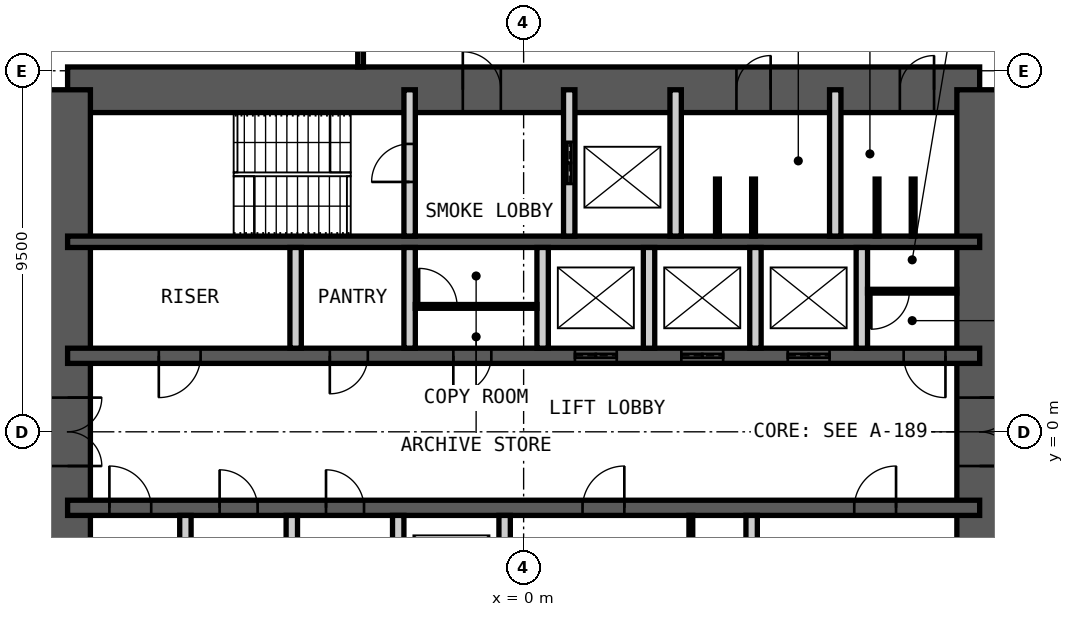
"""IFC4 building model, lengths in metres.
Left out: names, types, materials, properties, quantities, classifications, styles, units other than length and angle.
Written with IfcOpenShell. Run it as: python <this file> out.ifc"""

import sys

from ifc_helpers import new_model, si_unit, direction, frame, frame_2d, origin, place, context, subcontext, project, spatial, rectangle, extrude, element, fill, save


model = new_model("IFC4")
c1 = context("Model", 3, precision=1e-05, world=origin(), true_north=direction((0.0, 1.0)))
c2 = subcontext(c1, "Body", "Model", "MODEL_VIEW")
j1 = project(units=[si_unit("LENGTHUNIT", "METRE"), si_unit("PLANEANGLEUNIT", "RADIAN")], contexts=[c1])
p1 = place(None, origin())
s1 = spatial("IfcSite", under=j1, at=p1, CompositionType="ELEMENT")
p2 = place(p1, origin())
s2 = spatial("IfcBuilding", under=s1, at=p2, CompositionType="ELEMENT")
p3 = place(p2, frame((0.0, 0.0, 235.0)))
s3 = spatial("IfcBuildingStorey", under=s2, at=p3, CompositionType="ELEMENT", Elevation=235.0)
p4 = place(p3, frame((-12.0, 9.0, 0.0), z_axis=(0.0, 0.0, 1.0), x_axis=(1.0, 0.0, 0.0)))
e1 = element("IfcWall", 1, at=p4, inside=s3, PredefinedType="SHEAR", context=c2, shape_type="SweptSolid", body=[
    extrude(rectangle(XDim=24.0, YDim=1.2, at=frame_2d((12.0, 0.0))), origin(), (0.0, 0.0, 1.0), 4.2),
])
p5 = place(p4, frame((10.4, 0.0, 0.0)))
e2 = element("IfcOpeningElement", 2, at=p5, cuts=e1, PredefinedType="OPENING", context=c2, shape_type="SweptSolid", body=[
    extrude(rectangle(XDim=1.0, YDim=2.1, at=frame_2d((0.5, 1.05))), frame((0.0, 0.61, 0.0), z_axis=(0.0, -1.0, 0.0), x_axis=(1.0, 0.0, 0.0)), (0.0, 0.0, 1.0), 1.22),
])
p6 = place(p4, frame((17.6, 0.0, 0.0)))
e3 = element("IfcOpeningElement", 3, at=p6, cuts=e1, PredefinedType="OPENING", context=c2, shape_type="SweptSolid", body=[
    extrude(rectangle(XDim=0.9, YDim=2.1, at=frame_2d((0.45, 1.05))), frame((0.0, 0.61, 0.0), z_axis=(0.0, -1.0, 0.0), x_axis=(1.0, 0.0, 0.0)), (0.0, 0.0, 1.0), 1.22),
])
p7 = place(p4, frame((21.9, 0.0, 0.0)))
e4 = element("IfcOpeningElement", 4, at=p7, cuts=e1, PredefinedType="OPENING", context=c2, shape_type="SweptSolid", body=[
    extrude(rectangle(XDim=0.9, YDim=2.1, at=frame_2d((0.45, 1.05))), frame((0.0, 0.61, 0.0), z_axis=(0.0, -1.0, 0.0), x_axis=(1.0, 0.0, 0.0)), (0.0, 0.0, 1.0), 1.22),
])
p8 = place(p3, frame((12.0, -9.0, 0.0), z_axis=(0.0, 0.0, 1.0), x_axis=(0.0, 1.0, 0.0)))
e5 = element("IfcWall", 5, at=p8, inside=s3, PredefinedType="SHEAR", context=c2, shape_type="SweptSolid", body=[
    extrude(rectangle(XDim=18.0, YDim=1.2, at=frame_2d((9.0, 0.0))), origin(), (0.0, 0.0, 1.0), 4.2),
])
p9 = place(p8, frame((8.1, 0.0, 0.0)))
e6 = element("IfcOpeningElement", 6, at=p9, cuts=e5, PredefinedType="OPENING", context=c2, shape_type="SweptSolid", body=[
    extrude(rectangle(XDim=1.8, YDim=2.1, at=frame_2d((0.9, 1.05))), frame((0.0, 0.61, 0.0), z_axis=(0.0, -1.0, 0.0), x_axis=(1.0, 0.0, 0.0)), (0.0, 0.0, 1.0), 1.22),
])
p10 = place(p3, frame((-12.0, -9.0, 0.0), z_axis=(0.0, 0.0, 1.0), x_axis=(0.0, 1.0, 0.0)))
e7 = element("IfcWall", 7, at=p10, inside=s3, PredefinedType="SHEAR", context=c2, shape_type="SweptSolid", body=[
    extrude(rectangle(XDim=18.0, YDim=1.2, at=frame_2d((9.0, 0.0))), origin(), (0.0, 0.0, 1.0), 4.2),
])
p11 = place(p10, frame((8.1, 0.0, 0.0)))
e8 = element("IfcOpeningElement", 8, at=p11, cuts=e7, PredefinedType="OPENING", context=c2, shape_type="SweptSolid", body=[
    extrude(rectangle(XDim=1.8, YDim=2.1, at=frame_2d((0.9, 1.05))), frame((0.0, 0.61, 0.0), z_axis=(0.0, -1.0, 0.0), x_axis=(1.0, 0.0, 0.0)), (0.0, 0.0, 1.0), 1.22),
])
p12 = place(p3, frame((-12.0, 5.0, 0.0), z_axis=(0.0, 0.0, 1.0), x_axis=(1.0, 0.0, 0.0)))
e9 = element("IfcWall", 9, at=p12, inside=s3, PredefinedType="SHEAR", context=c2, shape_type="SweptSolid", body=[
    extrude(rectangle(XDim=24.0, YDim=0.3, at=frame_2d((12.0, 0.0))), origin(), (0.0, 0.0, 1.0), 4.2),
])
p13 = place(p3, frame((-12.0, 2.0, 0.0), z_axis=(0.0, 0.0, 1.0), x_axis=(1.0, 0.0, 0.0)))
e10 = element("IfcWall", 10, at=p13, inside=s3, PredefinedType="SHEAR", context=c2, shape_type="SweptSolid", body=[
    extrude(rectangle(XDim=24.0, YDim=0.4, at=frame_2d((12.0, 0.0))), origin(), (0.0, 0.0, 1.0), 4.2),
])
p14 = place(p13, frame((2.4, 0.0, 0.0)))
e11 = element("IfcOpeningElement", 11, at=p14, cuts=e10, PredefinedType="OPENING", context=c2, shape_type="SweptSolid", body=[
    extrude(rectangle(XDim=1.1, YDim=2.1, at=frame_2d((0.55, 1.05))), frame((0.0, 0.21, 0.0), z_axis=(0.0, -1.0, 0.0), x_axis=(1.0, 0.0, 0.0)), (0.0, 0.0, 1.0), 0.42),
])
p15 = place(p13, frame((22.0, 0.0, 0.0)))
e12 = element("IfcOpeningElement", 12, at=p15, cuts=e10, PredefinedType="OPENING", context=c2, shape_type="SweptSolid", body=[
    extrude(rectangle(XDim=1.1, YDim=2.1, at=frame_2d((0.55, 1.05))), frame((0.0, 0.21, 0.0), z_axis=(0.0, -1.0, 0.0), x_axis=(1.0, 0.0, 0.0)), (0.0, 0.0, 1.0), 0.42),
])
p16 = place(p13, frame((10.15, 0.0, 0.0)))
e13 = element("IfcOpeningElement", 13, at=p16, cuts=e10, PredefinedType="OPENING", context=c2, shape_type="SweptSolid", body=[
    extrude(rectangle(XDim=1.0, YDim=2.1, at=frame_2d((0.5, 1.05))), frame((0.0, 0.21, 0.0), z_axis=(0.0, -1.0, 0.0), x_axis=(1.0, 0.0, 0.0)), (0.0, 0.0, 1.0), 0.42),
])
p17 = place(p13, frame((6.9, 0.0, 0.0)))
e14 = element("IfcOpeningElement", 14, at=p17, cuts=e10, PredefinedType="OPENING", context=c2, shape_type="SweptSolid", body=[
    extrude(rectangle(XDim=1.0, YDim=2.1, at=frame_2d((0.5, 1.05))), frame((0.0, 0.21, 0.0), z_axis=(0.0, -1.0, 0.0), x_axis=(1.0, 0.0, 0.0)), (0.0, 0.0, 1.0), 0.42),
])
p18 = place(p13, frame((13.35, 0.0, 0.0)))
e15 = element("IfcOpeningElement", 15, at=p18, cuts=e10, PredefinedType="OPENING", context=c2, shape_type="SweptSolid", body=[
    extrude(rectangle(XDim=1.1, YDim=2.4, at=frame_2d((0.55, 1.2))), frame((0.0, 0.21, 0.0), z_axis=(0.0, -1.0, 0.0), x_axis=(1.0, 0.0, 0.0)), (0.0, 0.0, 1.0), 0.42),
])
p19 = place(p13, frame((16.15, 0.0, 0.0)))
e16 = element("IfcOpeningElement", 16, at=p19, cuts=e10, PredefinedType="OPENING", context=c2, shape_type="SweptSolid", body=[
    extrude(rectangle(XDim=1.1, YDim=2.4, at=frame_2d((0.55, 1.2))), frame((0.0, 0.21, 0.0), z_axis=(0.0, -1.0, 0.0), x_axis=(1.0, 0.0, 0.0)), (0.0, 0.0, 1.0), 0.42),
])
p20 = place(p13, frame((18.95, 0.0, 0.0)))
e17 = element("IfcOpeningElement", 17, at=p20, cuts=e10, PredefinedType="OPENING", context=c2, shape_type="SweptSolid", body=[
    extrude(rectangle(XDim=1.1, YDim=2.4, at=frame_2d((0.55, 1.2))), frame((0.0, 0.21, 0.0), z_axis=(0.0, -1.0, 0.0), x_axis=(1.0, 0.0, 0.0)), (0.0, 0.0, 1.0), 0.42),
])
p21 = place(p3, frame((-12.0, -2.0, 0.0), z_axis=(0.0, 0.0, 1.0), x_axis=(1.0, 0.0, 0.0)))
e18 = element("IfcWall", 18, at=p21, inside=s3, PredefinedType="SHEAR", context=c2, shape_type="SweptSolid", body=[
    extrude(rectangle(XDim=24.0, YDim=0.4, at=frame_2d((12.0, 0.0))), origin(), (0.0, 0.0, 1.0), 4.2),
])
p22 = place(p21, frame((1.1, 0.0, 0.0)))
e19 = element("IfcOpeningElement", 19, at=p22, cuts=e18, PredefinedType="OPENING", context=c2, shape_type="SweptSolid", body=[
    extrude(rectangle(XDim=1.1, YDim=2.1, at=frame_2d((0.55, 1.05))), frame((0.0, 0.21, 0.0), z_axis=(0.0, -1.0, 0.0), x_axis=(1.0, 0.0, 0.0)), (0.0, 0.0, 1.0), 0.42),
])
p23 = place(p21, frame((13.55, 0.0, 0.0)))
e20 = element("IfcOpeningElement", 20, at=p23, cuts=e18, PredefinedType="OPENING", context=c2, shape_type="SweptSolid", body=[
    extrude(rectangle(XDim=1.1, YDim=2.1, at=frame_2d((0.55, 1.05))), frame((0.0, 0.21, 0.0), z_axis=(0.0, -1.0, 0.0), x_axis=(1.0, 0.0, 0.0)), (0.0, 0.0, 1.0), 0.42),
])
p24 = place(p21, frame((20.7, 0.0, 0.0)))
e21 = element("IfcOpeningElement", 21, at=p24, cuts=e18, PredefinedType="OPENING", context=c2, shape_type="SweptSolid", body=[
    extrude(rectangle(XDim=1.1, YDim=2.1, at=frame_2d((0.55, 1.05))), frame((0.0, 0.21, 0.0), z_axis=(0.0, -1.0, 0.0), x_axis=(1.0, 0.0, 0.0)), (0.0, 0.0, 1.0), 0.42),
])
p25 = place(p21, frame((4.0, 0.0, 0.0)))
e22 = element("IfcOpeningElement", 22, at=p25, cuts=e18, PredefinedType="OPENING", context=c2, shape_type="SweptSolid", body=[
    extrude(rectangle(XDim=1.0, YDim=2.1, at=frame_2d((0.5, 1.05))), frame((0.0, 0.21, 0.0), z_axis=(0.0, -1.0, 0.0), x_axis=(1.0, 0.0, 0.0)), (0.0, 0.0, 1.0), 0.42),
])
p26 = place(p21, frame((6.8, 0.0, 0.0)))
e23 = element("IfcOpeningElement", 23, at=p26, cuts=e18, PredefinedType="OPENING", context=c2, shape_type="SweptSolid", body=[
    extrude(rectangle(XDim=1.0, YDim=2.1, at=frame_2d((0.5, 1.05))), frame((0.0, 0.21, 0.0), z_axis=(0.0, -1.0, 0.0), x_axis=(1.0, 0.0, 0.0)), (0.0, 0.0, 1.0), 0.42),
])
p27 = place(p3, frame((-3.0, 5.15, 0.0), z_axis=(0.0, 0.0, 1.0), x_axis=(0.0, 1.0, 0.0)))
e24 = element("IfcWall", 24, at=p27, inside=s3, PredefinedType="PARTITIONING", context=c2, shape_type="SweptSolid", body=[
    extrude(rectangle(XDim=3.85, YDim=0.3, at=frame_2d((1.925, 0.0))), origin(), (0.0, 0.0, 1.0), 3.98),
])
p28 = place(p27, frame((1.425, 0.0, 0.0)))
e25 = element("IfcOpeningElement", 25, at=p28, cuts=e24, PredefinedType="OPENING", context=c2, shape_type="SweptSolid", body=[
    extrude(rectangle(XDim=1.0, YDim=2.1, at=frame_2d((0.5, 1.05))), frame((0.0, 0.16, 0.0), z_axis=(0.0, -1.0, 0.0), x_axis=(1.0, 0.0, 0.0)), (0.0, 0.0, 1.0), 0.32),
])
p29 = place(p3, frame((1.2, 5.15, 0.0), z_axis=(0.0, 0.0, 1.0), x_axis=(0.0, 1.0, 0.0)))
e26 = element("IfcWall", 26, at=p29, inside=s3, PredefinedType="PARTITIONING", context=c2, shape_type="SweptSolid", body=[
    extrude(rectangle(XDim=3.85, YDim=0.3, at=frame_2d((1.925, 0.0))), origin(), (0.0, 0.0, 1.0), 3.98),
])
p30 = place(p29, frame((1.375, 0.0, 0.0)))
e27 = element("IfcOpeningElement", 27, at=p30, cuts=e26, PredefinedType="OPENING", context=c2, shape_type="SweptSolid", body=[
    extrude(rectangle(XDim=1.1, YDim=2.4, at=frame_2d((0.55, 1.2))), frame((0.0, 0.16, 0.0), z_axis=(0.0, -1.0, 0.0), x_axis=(1.0, 0.0, 0.0)), (0.0, 0.0, 1.0), 0.32),
])
for number, where, z_axis, x_axis in (
    (28, (4.0, 5.15, 0.0), (0.0, 0.0, 1.0), (0.0, 1.0, 0.0)),
    (29, (8.2, 5.15, 0.0), (0.0, 0.0, 1.0), (0.0, 1.0, 0.0)),
):
    element("IfcWall", number, at=place(p3, frame(where, z_axis=z_axis, x_axis=x_axis)), inside=s3, PredefinedType="PARTITIONING", context=c2, shape_type="SweptSolid", body=[
        extrude(rectangle(XDim=3.85, YDim=0.3, at=frame_2d((1.925, 0.0))), origin(), (0.0, 0.0, 1.0), 3.98),
    ])
for number, where, z_axis, x_axis in (
    (30, (-6.0, 2.2, 0.0), (0.0, 0.0, 1.0), (0.0, 1.0, 0.0)),
    (31, (-3.0, 2.2, 0.0), (0.0, 0.0, 1.0), (0.0, 1.0, 0.0)),
    (32, (0.5, 2.2, 0.0), (0.0, 0.0, 1.0), (0.0, 1.0, 0.0)),
    (33, (3.3, 2.2, 0.0), (0.0, 0.0, 1.0), (0.0, 1.0, 0.0)),
    (34, (6.1, 2.2, 0.0), (0.0, 0.0, 1.0), (0.0, 1.0, 0.0)),
    (35, (8.9, 2.2, 0.0), (0.0, 0.0, 1.0), (0.0, 1.0, 0.0)),
    (36, (-8.9, -4.85, 0.0), (0.0, 0.0, 1.0), (0.0, 1.0, 0.0)),
    (37, (-6.1, -4.85, 0.0), (0.0, 0.0, 1.0), (0.0, 1.0, 0.0)),
    (38, (-3.3, -4.85, 0.0), (0.0, 0.0, 1.0), (0.0, 1.0, 0.0)),
    (39, (-0.5, -4.85, 0.0), (0.0, 0.0, 1.0), (0.0, 1.0, 0.0)),
    (40, (6.0, -4.85, 0.0), (0.0, 0.0, 1.0), (0.0, 1.0, 0.0)),
):
    element("IfcWall", number, at=place(p3, frame(where, z_axis=z_axis, x_axis=x_axis)), inside=s3, PredefinedType="PARTITIONING", context=c2, shape_type="SweptSolid", body=[
        extrude(rectangle(XDim=2.65, YDim=0.3, at=frame_2d((1.325, 0.0))), origin(), (0.0, 0.0, 1.0), 3.98),
    ])
p31 = place(p3, frame((-2.85, 3.3, 0.0), z_axis=(0.0, 0.0, 1.0), x_axis=(1.0, 0.0, 0.0)))
e41 = element("IfcWall", 41, at=p31, inside=s3, PredefinedType="PARTITIONING", context=c2, shape_type="SweptSolid", body=[
    extrude(rectangle(XDim=3.2, YDim=0.1, at=frame_2d((1.6, 0.0))), origin(), (0.0, 0.0, 1.0), 3.98),
])
p32 = place(p31, frame((0.1, 0.0, 0.0)))
e42 = element("IfcOpeningElement", 42, at=p32, cuts=e41, PredefinedType="OPENING", context=c2, shape_type="SweptSolid", body=[
    extrude(rectangle(XDim=1.0, YDim=2.4, at=frame_2d((0.5, 1.2))), frame((0.0, 0.06, 0.0), z_axis=(0.0, -1.0, 0.0), x_axis=(1.0, 0.0, 0.0)), (0.0, 0.0, 1.0), 0.12),
])
p33 = place(p3, frame((4.4, -4.85, 0.0), z_axis=(0.0, 0.0, 1.0), x_axis=(0.0, 1.0, 0.0)))
e43 = element("IfcWall", 43, at=p33, inside=s3, PredefinedType="PARTITIONING", context=c2, shape_type="SweptSolid", body=[
    extrude(rectangle(XDim=2.65, YDim=0.1, at=frame_2d((1.325, 0.0))), origin(), (0.0, 0.0, 1.0), 3.98),
])
p34 = place(p33, frame((0.1, 0.0, 0.0)))
e44 = element("IfcOpeningElement", 44, at=p34, cuts=e43, PredefinedType="OPENING", context=c2, shape_type="SweptSolid", body=[
    extrude(rectangle(XDim=1.0, YDim=2.4, at=frame_2d((0.5, 1.2))), frame((0.0, 0.06, 0.0), z_axis=(0.0, -1.0, 0.0), x_axis=(1.0, 0.0, 0.0)), (0.0, 0.0, 1.0), 0.12),
])
p35 = place(p3, frame((9.05, 3.7, 0.0), z_axis=(0.0, 0.0, 1.0), x_axis=(1.0, 0.0, 0.0)))
e45 = element("IfcWall", 45, at=p35, inside=s3, PredefinedType="PARTITIONING", context=c2, shape_type="SweptSolid", body=[
    extrude(rectangle(XDim=2.35, YDim=0.1, at=frame_2d((1.175, 0.0))), origin(), (0.0, 0.0, 1.0), 3.98),
])
p36 = place(p35, frame((0.1, 0.0, 0.0)))
e46 = element("IfcOpeningElement", 46, at=p36, cuts=e45, PredefinedType="OPENING", context=c2, shape_type="SweptSolid", body=[
    extrude(rectangle(XDim=1.0, YDim=2.4, at=frame_2d((0.5, 1.2))), frame((0.0, 0.06, 0.0), z_axis=(0.0, -1.0, 0.0), x_axis=(1.0, 0.0, 0.0)), (0.0, 0.0, 1.0), 0.12),
])
for number, where, z_axis, x_axis in (
    (47, (5.1, 5.15, 0.0), (0.0, 0.0, 1.0), (0.0, 1.0, 0.0)),
    (48, (6.05, 5.15, 0.0), (0.0, 0.0, 1.0), (0.0, 1.0, 0.0)),
    (49, (9.3, 5.15, 0.0), (0.0, 0.0, 1.0), (0.0, 1.0, 0.0)),
    (50, (10.25, 5.15, 0.0), (0.0, 0.0, 1.0), (0.0, 1.0, 0.0)),
):
    element("IfcWall", number, at=place(p3, frame(where, z_axis=z_axis, x_axis=x_axis)), inside=s3, PredefinedType="PARTITIONING", context=c2, shape_type="SweptSolid", body=[
        extrude(rectangle(XDim=1.5, YDim=0.1, at=frame_2d((0.75, 0.0))), origin(), (0.0, 0.0, 1.0), 2.1),
    ])
p37 = place(p3, frame((-4.291, 9.6, 0.0), z_axis=(0.0, 0.0, 1.0), x_axis=(0.0, 1.0, 0.0)))
e51 = element("IfcWall", 51, at=p37, inside=s3, PredefinedType="PARTITIONING", context=c2, shape_type="SweptSolid", body=[
    extrude(rectangle(XDim=1.875, YDim=0.15, at=frame_2d((0.938, 0.0))), origin(), (0.0, 0.0, 1.0), 4.03),
])
p38 = place(p5, origin())
e52 = element("IfcDoor", 52, at=p38, inside=s3, OperationType="SINGLE_SWING_RIGHT", PredefinedType="DOOR", context=c2, shape_type="SweptSolid", body=[
    extrude(rectangle(XDim=1.0, YDim=2.1, at=frame_2d((0.5, 1.05))), frame((0.0, 0.025, 0.0), z_axis=(0.0, -1.0, 0.0), x_axis=(1.0, 0.0, 0.0)), (0.0, 0.0, 1.0), 0.05),
])
fill(e2, e52)
p39 = place(p6, origin())
e53 = element("IfcDoor", 53, at=p39, inside=s3, OperationType="SINGLE_SWING_LEFT", PredefinedType="DOOR", context=c2, shape_type="SweptSolid", body=[
    extrude(rectangle(XDim=0.9, YDim=2.1, at=frame_2d((0.45, 1.05))), frame((0.0, 0.025, 0.0), z_axis=(0.0, -1.0, 0.0), x_axis=(1.0, 0.0, 0.0)), (0.0, 0.0, 1.0), 0.05),
])
fill(e3, e53)
p40 = place(p7, origin())
e54 = element("IfcDoor", 54, at=p40, inside=s3, OperationType="SINGLE_SWING_LEFT", PredefinedType="DOOR", context=c2, shape_type="SweptSolid", body=[
    extrude(rectangle(XDim=0.9, YDim=2.1, at=frame_2d((0.45, 1.05))), frame((0.0, 0.025, 0.0), z_axis=(0.0, -1.0, 0.0), x_axis=(1.0, 0.0, 0.0)), (0.0, 0.0, 1.0), 0.05),
])
fill(e4, e54)
p41 = place(p28, origin())
e55 = element("IfcDoor", 55, at=p41, inside=s3, OperationType="SINGLE_SWING_RIGHT", PredefinedType="DOOR", context=c2, shape_type="SweptSolid", body=[
    extrude(rectangle(XDim=1.0, YDim=2.1, at=frame_2d((0.5, 1.05))), frame((0.0, 0.025, 0.0), z_axis=(0.0, -1.0, 0.0), x_axis=(1.0, 0.0, 0.0)), (0.0, 0.0, 1.0), 0.05),
])
fill(e25, e55)
p42 = place(p14, origin())
e56 = element("IfcDoor", 56, at=p42, inside=s3, OperationType="SINGLE_SWING_LEFT", PredefinedType="DOOR", context=c2, shape_type="SweptSolid", body=[
    extrude(rectangle(XDim=1.1, YDim=2.1, at=frame_2d((0.55, 1.05))), frame((0.0, 0.025, 0.0), z_axis=(0.0, -1.0, 0.0), x_axis=(1.0, 0.0, 0.0)), (0.0, 0.0, 1.0), 0.05),
])
fill(e11, e56)
p43 = place(p22, origin())
e57 = element("IfcDoor", 57, at=p43, inside=s3, OperationType="SINGLE_SWING_RIGHT", PredefinedType="DOOR", context=c2, shape_type="SweptSolid", body=[
    extrude(rectangle(XDim=1.1, YDim=2.1, at=frame_2d((0.55, 1.05))), frame((0.0, 0.025, 0.0), z_axis=(0.0, -1.0, 0.0), x_axis=(1.0, 0.0, 0.0)), (0.0, 0.0, 1.0), 0.05),
])
fill(e19, e57)
p44 = place(p15, origin())
e58 = element("IfcDoor", 58, at=p44, inside=s3, OperationType="SINGLE_SWING_RIGHT", PredefinedType="DOOR", context=c2, shape_type="SweptSolid", body=[
    extrude(rectangle(XDim=1.1, YDim=2.1, at=frame_2d((0.55, 1.05))), frame((0.0, 0.025, 0.0), z_axis=(0.0, -1.0, 0.0), x_axis=(1.0, 0.0, 0.0)), (0.0, 0.0, 1.0), 0.05),
])
fill(e12, e58)
p45 = place(p16, origin())
e59 = element("IfcDoor", 59, at=p45, inside=s3, OperationType="SINGLE_SWING_LEFT", PredefinedType="DOOR", context=c2, shape_type="SweptSolid", body=[
    extrude(rectangle(XDim=1.0, YDim=2.1, at=frame_2d((0.5, 1.05))), frame((0.0, 0.025, 0.0), z_axis=(0.0, -1.0, 0.0), x_axis=(1.0, 0.0, 0.0)), (0.0, 0.0, 1.0), 0.05),
])
fill(e13, e59)
p46 = place(p23, origin())
e60 = element("IfcDoor", 60, at=p46, inside=s3, OperationType="SINGLE_SWING_LEFT", PredefinedType="DOOR", context=c2, shape_type="SweptSolid", body=[
    extrude(rectangle(XDim=1.1, YDim=2.1, at=frame_2d((0.55, 1.05))), frame((0.0, 0.025, 0.0), z_axis=(0.0, -1.0, 0.0), x_axis=(1.0, 0.0, 0.0)), (0.0, 0.0, 1.0), 0.05),
])
fill(e20, e60)
p47 = place(p24, origin())
e61 = element("IfcDoor", 61, at=p47, inside=s3, OperationType="SINGLE_SWING_LEFT", PredefinedType="DOOR", context=c2, shape_type="SweptSolid", body=[
    extrude(rectangle(XDim=1.1, YDim=2.1, at=frame_2d((0.55, 1.05))), frame((0.0, 0.025, 0.0), z_axis=(0.0, -1.0, 0.0), x_axis=(1.0, 0.0, 0.0)), (0.0, 0.0, 1.0), 0.05),
])
fill(e21, e61)
p48 = place(p9, origin())
e62 = element("IfcDoor", 62, at=p48, inside=s3, OperationType="DOUBLE_DOOR_DOUBLE_SWING", PredefinedType="DOOR", context=c2, shape_type="SweptSolid", body=[
    extrude(rectangle(XDim=1.8, YDim=2.1, at=frame_2d((0.9, 1.05))), frame((0.0, 0.025, 0.0), z_axis=(0.0, -1.0, 0.0), x_axis=(1.0, 0.0, 0.0)), (0.0, 0.0, 1.0), 0.05),
])
fill(e6, e62)
p49 = place(p11, origin())
e63 = element("IfcDoor", 63, at=p49, inside=s3, OperationType="DOUBLE_DOOR_DOUBLE_SWING", PredefinedType="DOOR", context=c2, shape_type="SweptSolid", body=[
    extrude(rectangle(XDim=1.8, YDim=2.1, at=frame_2d((0.9, 1.05))), frame((0.0, 0.025, 0.0), z_axis=(0.0, -1.0, 0.0), x_axis=(1.0, 0.0, 0.0)), (0.0, 0.0, 1.0), 0.05),
])
fill(e8, e63)
p50 = place(p30, origin())
e64 = element("IfcDoor", 64, at=p50, inside=s3, OperationType="DOUBLE_DOOR_SLIDING", PredefinedType="DOOR", context=c2, shape_type="SweptSolid", body=[
    extrude(rectangle(XDim=1.1, YDim=2.4, at=frame_2d((0.55, 1.2))), frame((0.0, 0.025, 0.0), z_axis=(0.0, -1.0, 0.0), x_axis=(1.0, 0.0, 0.0)), (0.0, 0.0, 1.0), 0.05),
])
fill(e27, e64)
p51 = place(p17, origin())
e65 = element("IfcDoor", 65, at=p51, inside=s3, OperationType="SINGLE_SWING_LEFT", PredefinedType="DOOR", context=c2, shape_type="SweptSolid", body=[
    extrude(rectangle(XDim=1.0, YDim=2.1, at=frame_2d((0.5, 1.05))), frame((0.0, 0.025, 0.0), z_axis=(0.0, -1.0, 0.0), x_axis=(1.0, 0.0, 0.0)), (0.0, 0.0, 1.0), 0.05),
])
fill(e14, e65)
p52 = place(p18, origin())
e66 = element("IfcDoor", 66, at=p52, inside=s3, OperationType="DOUBLE_DOOR_SLIDING", PredefinedType="DOOR", context=c2, shape_type="SweptSolid", body=[
    extrude(rectangle(XDim=1.1, YDim=2.4, at=frame_2d((0.55, 1.2))), frame((0.0, 0.025, 0.0), z_axis=(0.0, -1.0, 0.0), x_axis=(1.0, 0.0, 0.0)), (0.0, 0.0, 1.0), 0.05),
])
fill(e15, e66)
p53 = place(p19, origin())
e67 = element("IfcDoor", 67, at=p53, inside=s3, OperationType="DOUBLE_DOOR_SLIDING", PredefinedType="DOOR", context=c2, shape_type="SweptSolid", body=[
    extrude(rectangle(XDim=1.1, YDim=2.4, at=frame_2d((0.55, 1.2))), frame((0.0, 0.025, 0.0), z_axis=(0.0, -1.0, 0.0), x_axis=(1.0, 0.0, 0.0)), (0.0, 0.0, 1.0), 0.05),
])
fill(e16, e67)
p54 = place(p20, origin())
e68 = element("IfcDoor", 68, at=p54, inside=s3, OperationType="DOUBLE_DOOR_SLIDING", PredefinedType="DOOR", context=c2, shape_type="SweptSolid", body=[
    extrude(rectangle(XDim=1.1, YDim=2.4, at=frame_2d((0.55, 1.2))), frame((0.0, 0.025, 0.0), z_axis=(0.0, -1.0, 0.0), x_axis=(1.0, 0.0, 0.0)), (0.0, 0.0, 1.0), 0.05),
])
fill(e17, e68)
p55 = place(p25, origin())
e69 = element("IfcDoor", 69, at=p55, inside=s3, OperationType="SINGLE_SWING_RIGHT", PredefinedType="DOOR", context=c2, shape_type="SweptSolid", body=[
    extrude(rectangle(XDim=1.0, YDim=2.1, at=frame_2d((0.5, 1.05))), frame((0.0, 0.025, 0.0), z_axis=(0.0, -1.0, 0.0), x_axis=(1.0, 0.0, 0.0)), (0.0, 0.0, 1.0), 0.05),
])
fill(e22, e69)
p56 = place(p26, origin())
e70 = element("IfcDoor", 70, at=p56, inside=s3, OperationType="SINGLE_SWING_RIGHT", PredefinedType="DOOR", context=c2, shape_type="SweptSolid", body=[
    extrude(rectangle(XDim=1.0, YDim=2.1, at=frame_2d((0.5, 1.05))), frame((0.0, 0.025, 0.0), z_axis=(0.0, -1.0, 0.0), x_axis=(1.0, 0.0, 0.0)), (0.0, 0.0, 1.0), 0.05),
])
fill(e23, e70)
p57 = place(p32, origin())
e71 = element("IfcDoor", 71, at=p57, inside=s3, OperationType="SINGLE_SWING_RIGHT", PredefinedType="DOOR", context=c2, shape_type="SweptSolid", body=[
    extrude(rectangle(XDim=1.0, YDim=2.4, at=frame_2d((0.5, 1.2))), frame((0.0, 0.025, 0.0), z_axis=(0.0, -1.0, 0.0), x_axis=(1.0, 0.0, 0.0)), (0.0, 0.0, 1.0), 0.05),
])
fill(e42, e71)
p58 = place(p36, origin())
e72 = element("IfcDoor", 72, at=p58, inside=s3, OperationType="SINGLE_SWING_LEFT", PredefinedType="DOOR", context=c2, shape_type="SweptSolid", body=[
    extrude(rectangle(XDim=1.0, YDim=2.4, at=frame_2d((0.5, 1.2))), frame((0.0, 0.025, 0.0), z_axis=(0.0, -1.0, 0.0), x_axis=(1.0, 0.0, 0.0)), (0.0, 0.0, 1.0), 0.05),
])
fill(e46, e72)
save(model, sys.argv[1])
